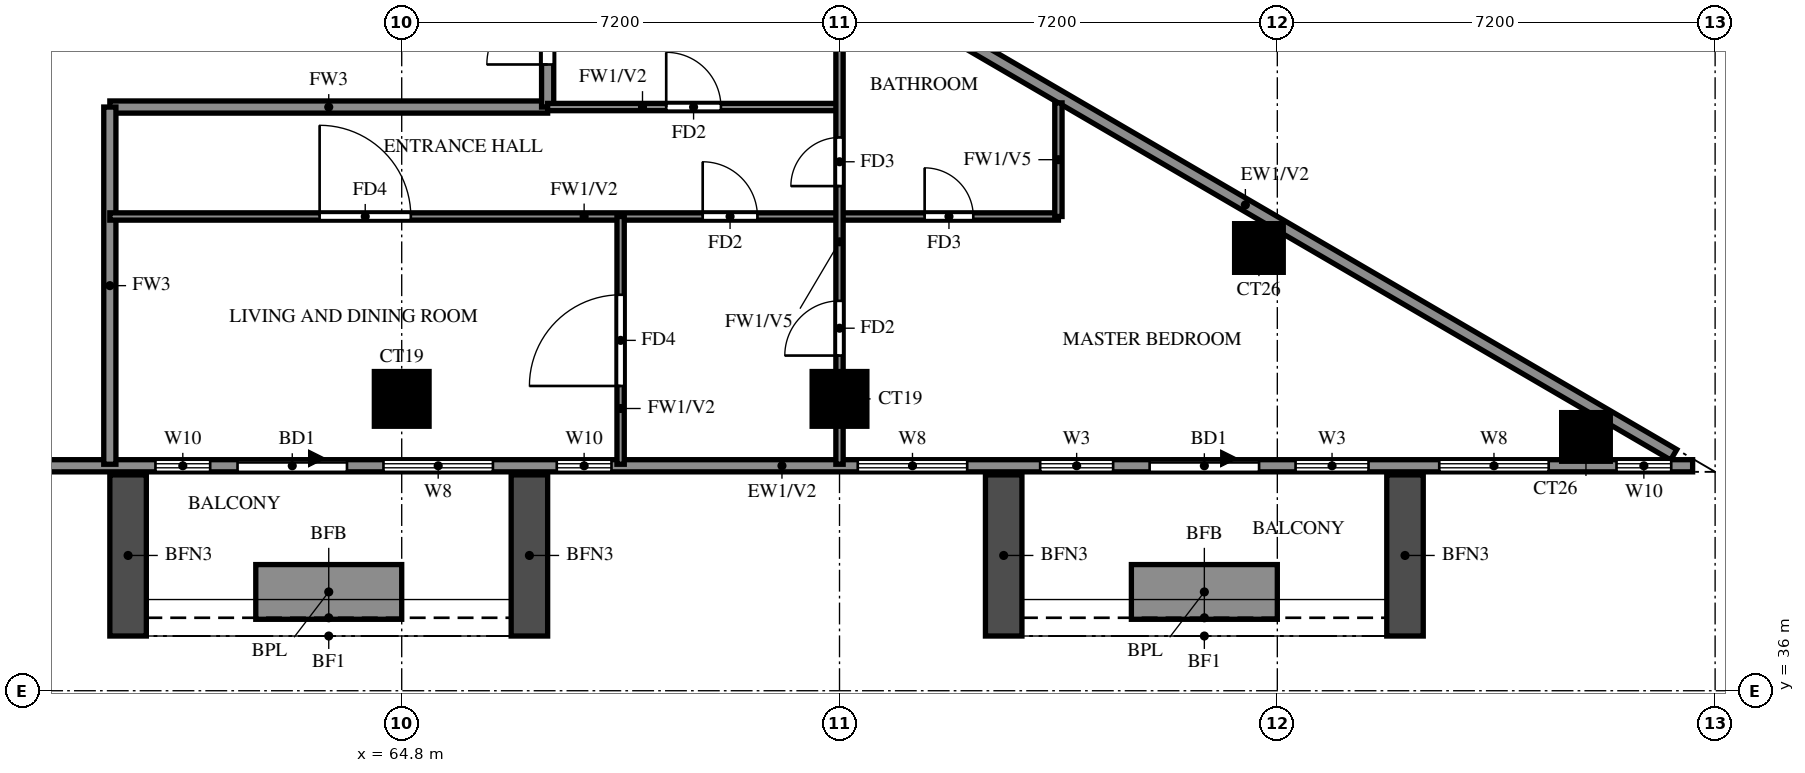
"""IFC4 building model, lengths in metres.
Left out: names, types, materials, properties, quantities, classifications, styles, units other than length and angle.
Written with IfcOpenShell. Run it as: python <this file> out.ifc"""

import sys

from ifc_helpers import new_model, si_unit, direction, frame, frame_2d, origin, origin_2d, place, context, subcontext, project, spatial, rectangle, extrude, source, transform, mapped, element, fill, save


model = new_model("IFC4")
c1 = context("Model", 3, precision=1e-05, world=origin(), true_north=direction((0.0, 1.0)))
c2 = subcontext(c1, "Body", "Model", "MODEL_VIEW")
j1 = project(units=[si_unit("LENGTHUNIT", "METRE"), si_unit("PLANEANGLEUNIT", "RADIAN")], contexts=[c1])
p1 = place(None, origin())
s1 = spatial("IfcSite", under=j1, at=p1, CompositionType="ELEMENT")
p2 = place(p1, origin())
s2 = spatial("IfcBuilding", under=s1, at=p2, CompositionType="ELEMENT")
p3 = place(p2, frame((0.0, 0.0, 174.5)))
s3 = spatial("IfcBuildingStorey", under=s2, at=p3, CompositionType="ELEMENT", Elevation=174.5)
m1 = source(origin(), c2, "Body", "SweptSolid", [
    extrude(rectangle(XDim=0.8, YDim=0.8, at=origin_2d()), origin(), (0.0, 0.0, 1.0), 3.2),
])
p4 = place(p3, frame((84.276, 40.174, 0.0), z_axis=(0.0, 0.0, 1.0), x_axis=(1.0, 0.0, 0.0)))
e1 = element("IfcColumn", 1, at=p4, inside=s3, PredefinedType="COLUMN", context=c2, shape_type="MappedRepresentation", body=[
    mapped(m1, transform((0.0, 0.0, 0.0))),
])
m2 = source(origin(), c2, "Body", "SweptSolid", [
    extrude(rectangle(XDim=0.9, YDim=0.9, at=origin_2d()), origin(), (0.0, 0.0, 1.0), 3.2),
])
for number, where, z_axis, x_axis in (
    (2, (64.8, 40.8, 0.0), (0.0, 0.0, 1.0), (1.0, 0.0, 0.0)),
    (3, (72.0, 40.8, 0.0), (0.0, 0.0, 1.0), (1.0, 0.0, 0.0)),
):
    element("IfcColumn", number, at=place(p3, frame(where, z_axis=z_axis, x_axis=x_axis)), inside=s3, PredefinedType="COLUMN", context=c2, shape_type="MappedRepresentation", body=[
        mapped(m2, transform((0.0, 0.0, 0.0))),
    ])
p5 = place(p3, frame((78.898, 43.282, 0.0), z_axis=(0.0, 0.0, 1.0), x_axis=(1.0, 0.0, 0.0)))
e4 = element("IfcColumn", 4, at=p5, inside=s3, PredefinedType="COLUMN", context=c2, shape_type="MappedRepresentation", body=[
    mapped(m1, transform((0.0, 0.0, 0.0))),
])
p6 = place(p3, frame((85.719, 39.881, 0.0), z_axis=(0.0, 0.0, 1.0), x_axis=(-0.86377618652, 0.503875678716, 0.0)))
e5 = element("IfcWall", 5, at=p6, inside=s3, PredefinedType="SOLIDWALL", context=c2, shape_type="SweptSolid", body=[
    extrude(rectangle(XDim=16.311, YDim=0.2, at=frame_2d((8.156, 0.0))), origin(), (0.0, 0.0, 1.0), 3.2),
])
p7 = place(p6, frame((13.326, 0.0, 1.5)))
e6 = element("IfcOpeningElement", 6, at=p7, cuts=e5, PredefinedType="OPENING", context=c2, shape_type="SweptSolid", body=[
    extrude(rectangle(XDim=0.9, YDim=0.9, at=frame_2d((0.45, 0.45))), frame((0.0, 0.11, 0.0), z_axis=(0.0, -1.0, 0.0), x_axis=(1.0, 0.0, 0.0)), (0.0, 0.0, 1.0), 0.22),
])
p8 = place(p3, frame((58.8, 39.7, 0.0), z_axis=(0.0, 0.0, 1.0), x_axis=(1.0, 0.0, 0.0)))
e7 = element("IfcWall", 7, at=p8, inside=s3, PredefinedType="SOLIDWALL", context=c2, shape_type="SweptSolid", body=[
    extrude(rectangle(XDim=27.23, YDim=0.2, at=frame_2d((13.615, 0.0))), origin(), (0.0, 0.0, 1.0), 3.2),
])
p9 = place(p8, frame((3.3, 0.0, 0.0)))
e8 = element("IfcOpeningElement", 8, at=p9, cuts=e7, PredefinedType="OPENING", context=c2, shape_type="SweptSolid", body=[
    extrude(rectangle(XDim=1.8, YDim=2.4, at=frame_2d((0.9, 1.2))), frame((0.0, 0.11, 0.0), z_axis=(0.0, -1.0, 0.0), x_axis=(1.0, 0.0, 0.0)), (0.0, 0.0, 1.0), 0.22),
])
p10 = place(p8, frame((18.3, 0.0, 0.0)))
e9 = element("IfcOpeningElement", 9, at=p10, cuts=e7, PredefinedType="OPENING", context=c2, shape_type="SweptSolid", body=[
    extrude(rectangle(XDim=1.8, YDim=2.4, at=frame_2d((0.9, 1.2))), frame((0.0, 0.11, 0.0), z_axis=(0.0, -1.0, 0.0), x_axis=(1.0, 0.0, 0.0)), (0.0, 0.0, 1.0), 0.22),
])
p11 = place(p8, frame((1.95, 0.0, 0.6)))
e10 = element("IfcOpeningElement", 10, at=p11, cuts=e7, PredefinedType="OPENING", context=c2, shape_type="SweptSolid", body=[
    extrude(rectangle(XDim=0.9, YDim=2.4, at=frame_2d((0.45, 1.2))), frame((0.0, 0.11, 0.0), z_axis=(0.0, -1.0, 0.0), x_axis=(1.0, 0.0, 0.0)), (0.0, 0.0, 1.0), 0.22),
])
p12 = place(p8, frame((5.7, 0.0, 0.6)))
e11 = element("IfcOpeningElement", 11, at=p12, cuts=e7, PredefinedType="OPENING", context=c2, shape_type="SweptSolid", body=[
    extrude(rectangle(XDim=1.8, YDim=2.4, at=frame_2d((0.9, 1.2))), frame((0.0, 0.11, 0.0), z_axis=(0.0, -1.0, 0.0), x_axis=(1.0, 0.0, 0.0)), (0.0, 0.0, 1.0), 0.22),
])
p13 = place(p8, frame((8.55, 0.0, 0.6)))
e12 = element("IfcOpeningElement", 12, at=p13, cuts=e7, PredefinedType="OPENING", context=c2, shape_type="SweptSolid", body=[
    extrude(rectangle(XDim=0.9, YDim=2.4, at=frame_2d((0.45, 1.2))), frame((0.0, 0.11, 0.0), z_axis=(0.0, -1.0, 0.0), x_axis=(1.0, 0.0, 0.0)), (0.0, 0.0, 1.0), 0.22),
])
p14 = place(p8, frame((13.5, 0.0, 0.6)))
e13 = element("IfcOpeningElement", 13, at=p14, cuts=e7, PredefinedType="OPENING", context=c2, shape_type="SweptSolid", body=[
    extrude(rectangle(XDim=1.8, YDim=2.4, at=frame_2d((0.9, 1.2))), frame((0.0, 0.11, 0.0), z_axis=(0.0, -1.0, 0.0), x_axis=(1.0, 0.0, 0.0)), (0.0, 0.0, 1.0), 0.22),
])
p15 = place(p8, frame((16.5, 0.0, 0.6)))
e14 = element("IfcOpeningElement", 14, at=p15, cuts=e7, PredefinedType="OPENING", context=c2, shape_type="SweptSolid", body=[
    extrude(rectangle(XDim=1.2, YDim=2.4, at=frame_2d((0.6, 1.2))), frame((0.0, 0.11, 0.0), z_axis=(0.0, -1.0, 0.0), x_axis=(1.0, 0.0, 0.0)), (0.0, 0.0, 1.0), 0.22),
])
p16 = place(p8, frame((20.7, 0.0, 0.6)))
e15 = element("IfcOpeningElement", 15, at=p16, cuts=e7, PredefinedType="OPENING", context=c2, shape_type="SweptSolid", body=[
    extrude(rectangle(XDim=1.2, YDim=2.4, at=frame_2d((0.6, 1.2))), frame((0.0, 0.11, 0.0), z_axis=(0.0, -1.0, 0.0), x_axis=(1.0, 0.0, 0.0)), (0.0, 0.0, 1.0), 0.22),
])
p17 = place(p8, frame((23.063, 0.0, 0.6)))
e16 = element("IfcOpeningElement", 16, at=p17, cuts=e7, PredefinedType="OPENING", context=c2, shape_type="SweptSolid", body=[
    extrude(rectangle(XDim=1.8, YDim=2.4, at=frame_2d((0.9, 1.2))), frame((0.0, 0.11, 0.0), z_axis=(0.0, -1.0, 0.0), x_axis=(1.0, 0.0, 0.0)), (0.0, 0.0, 1.0), 0.22),
])
p18 = place(p8, frame((25.978, 0.0, 0.6)))
e17 = element("IfcOpeningElement", 17, at=p18, cuts=e7, PredefinedType="OPENING", context=c2, shape_type="SweptSolid", body=[
    extrude(rectangle(XDim=0.9, YDim=2.4, at=frame_2d((0.45, 1.2))), frame((0.0, 0.11, 0.0), z_axis=(0.0, -1.0, 0.0), x_axis=(1.0, 0.0, 0.0)), (0.0, 0.0, 1.0), 0.22),
])
for number, where, z_axis, x_axis in (
    (18, (60.3, 39.55, 0.0), (0.0, 0.0, 1.0), (0.0, -1.0, 0.0)),
    (19, (66.9, 39.55, 0.0), (0.0, 0.0, 1.0), (0.0, -1.0, 0.0)),
):
    element("IfcWall", number, at=place(p3, frame(where, z_axis=z_axis, x_axis=x_axis)), inside=s3, PredefinedType="SOLIDWALL", context=c2, shape_type="SweptSolid", body=[
        extrude(rectangle(XDim=2.65, YDim=0.6, at=frame_2d((1.325, 0.0))), origin(), (0.0, 0.0, 1.0), 2.85),
    ])
p19 = place(p3, frame((62.4, 37.625, 0.0), z_axis=(0.0, 0.0, 1.0), x_axis=(1.0, 0.0, 0.0)))
e20 = element("IfcWall", 20, at=p19, inside=s3, PredefinedType="SOLIDWALL", context=c2, shape_type="SweptSolid", body=[
    extrude(rectangle(XDim=2.4, YDim=0.9, at=frame_2d((1.2, 0.0))), origin(), (0.0, 0.0, 1.0), 0.9),
])
for number, where, z_axis, x_axis in (
    (21, (74.7, 39.55, 0.0), (0.0, 0.0, 1.0), (0.0, -1.0, 0.0)),
    (22, (81.3, 39.55, 0.0), (0.0, 0.0, 1.0), (0.0, -1.0, 0.0)),
):
    element("IfcWall", number, at=place(p3, frame(where, z_axis=z_axis, x_axis=x_axis)), inside=s3, PredefinedType="SOLIDWALL", context=c2, shape_type="SweptSolid", body=[
        extrude(rectangle(XDim=2.65, YDim=0.6, at=frame_2d((1.325, 0.0))), origin(), (0.0, 0.0, 1.0), 2.85),
    ])
p20 = place(p3, frame((76.8, 37.625, 0.0), z_axis=(0.0, 0.0, 1.0), x_axis=(1.0, 0.0, 0.0)))
e23 = element("IfcWall", 23, at=p20, inside=s3, PredefinedType="SOLIDWALL", context=c2, shape_type="SweptSolid", body=[
    extrude(rectangle(XDim=2.4, YDim=0.9, at=frame_2d((1.2, 0.0))), origin(), (0.0, 0.0, 1.0), 0.9),
])
p21 = place(p3, frame((60.0, 45.6, 0.0), z_axis=(0.0, 0.0, 1.0), x_axis=(1.0, 0.0, 0.0)))
e24 = element("IfcWall", 24, at=p21, inside=s3, PredefinedType="SOLIDWALL", context=c2, shape_type="SweptSolid", body=[
    extrude(rectangle(XDim=7.2, YDim=0.2, at=frame_2d((3.6, 0.0))), origin(), (0.0, 0.0, 1.0), 3.2),
])
p22 = place(p3, frame((60.0, 39.725, 0.0), z_axis=(0.0, 0.0, 1.0), x_axis=(0.0, 1.0, 0.0)))
e25 = element("IfcWall", 25, at=p22, inside=s3, PredefinedType="SOLIDWALL", context=c2, shape_type="SweptSolid", body=[
    extrude(rectangle(XDim=5.875, YDim=0.2, at=frame_2d((2.938, 0.0))), origin(), (0.0, 0.0, 1.0), 3.2),
])
p23 = place(p3, frame((67.2, 45.6, 0.0), z_axis=(0.0, 0.0, 1.0), x_axis=(0.0, 1.0, 0.0)))
e26 = element("IfcWall", 26, at=p23, inside=s3, PredefinedType="SOLIDWALL", context=c2, shape_type="SweptSolid", body=[
    extrude(rectangle(XDim=8.4, YDim=0.2, at=frame_2d((4.2, 0.0))), origin(), (0.0, 0.0, 1.0), 3.2),
])
p24 = place(p23, frame((6.7, 0.0, 0.0)))
e27 = element("IfcOpeningElement", 27, at=p24, cuts=e26, PredefinedType="OPENING", context=c2, shape_type="SweptSolid", body=[
    extrude(rectangle(XDim=1.0, YDim=2.1, at=frame_2d((0.5, 1.05))), frame((0.0, 0.11, 0.0), z_axis=(0.0, -1.0, 0.0), x_axis=(1.0, 0.0, 0.0)), (0.0, 0.0, 1.0), 0.22),
])
p25 = place(p23, frame((0.7, 0.0, 0.0)))
e28 = element("IfcOpeningElement", 28, at=p25, cuts=e26, PredefinedType="OPENING", context=c2, shape_type="SweptSolid", body=[
    extrude(rectangle(XDim=1.0, YDim=2.1, at=frame_2d((0.5, 1.05))), frame((0.0, 0.11, 0.0), z_axis=(0.0, -1.0, 0.0), x_axis=(1.0, 0.0, 0.0)), (0.0, 0.0, 1.0), 0.22),
])
p26 = place(p3, frame((60.0, 43.8, 0.0), z_axis=(0.0, 0.0, 1.0), x_axis=(1.0, 0.0, 0.0)))
e29 = element("IfcWall", 29, at=p26, inside=s3, PredefinedType="PARTITIONING", context=c2, shape_type="SweptSolid", body=[
    extrude(rectangle(XDim=15.6, YDim=0.12, at=frame_2d((7.8, 0.0))), origin(), (0.0, 0.0, 1.0), 3.2),
])
p27 = place(p26, frame((9.75, 0.0, 0.0)))
e30 = element("IfcOpeningElement", 30, at=p27, cuts=e29, PredefinedType="OPENING", context=c2, shape_type="SweptSolid", body=[
    extrude(rectangle(XDim=0.9, YDim=2.1, at=frame_2d((0.45, 1.05))), frame((0.0, 0.07, 0.0), z_axis=(0.0, -1.0, 0.0), x_axis=(1.0, 0.0, 0.0)), (0.0, 0.0, 1.0), 0.14),
])
p28 = place(p26, frame((3.45, 0.0, 0.0)))
e31 = element("IfcOpeningElement", 31, at=p28, cuts=e29, PredefinedType="OPENING", context=c2, shape_type="SweptSolid", body=[
    extrude(rectangle(XDim=1.5, YDim=2.1, at=frame_2d((0.75, 1.05))), frame((0.0, 0.07, 0.0), z_axis=(0.0, -1.0, 0.0), x_axis=(1.0, 0.0, 0.0)), (0.0, 0.0, 1.0), 0.14),
])
p29 = place(p26, frame((13.4, 0.0, 0.0)))
e32 = element("IfcOpeningElement", 32, at=p29, cuts=e29, PredefinedType="OPENING", context=c2, shape_type="SweptSolid", body=[
    extrude(rectangle(XDim=0.8, YDim=2.1, at=frame_2d((0.4, 1.05))), frame((0.0, 0.07, 0.0), z_axis=(0.0, -1.0, 0.0), x_axis=(1.0, 0.0, 0.0)), (0.0, 0.0, 1.0), 0.14),
])
p30 = place(p3, frame((67.2, 45.6, 0.0), z_axis=(0.0, 0.0, 1.0), x_axis=(1.0, 0.0, 0.0)))
e33 = element("IfcWall", 33, at=p30, inside=s3, PredefinedType="PARTITIONING", context=c2, shape_type="SweptSolid", body=[
    extrude(rectangle(XDim=4.8, YDim=0.12, at=frame_2d((2.4, 0.0))), origin(), (0.0, 0.0, 1.0), 3.2),
])
p31 = place(p30, frame((1.95, 0.0, 0.0)))
e34 = element("IfcOpeningElement", 34, at=p31, cuts=e33, PredefinedType="OPENING", context=c2, shape_type="SweptSolid", body=[
    extrude(rectangle(XDim=0.9, YDim=2.1, at=frame_2d((0.45, 1.05))), frame((0.0, 0.07, 0.0), z_axis=(0.0, -1.0, 0.0), x_axis=(1.0, 0.0, 0.0)), (0.0, 0.0, 1.0), 0.14),
])
p32 = place(p3, frame((68.4, 39.725, 0.0), z_axis=(0.0, 0.0, 1.0), x_axis=(0.0, 1.0, 0.0)))
e35 = element("IfcWall", 35, at=p32, inside=s3, PredefinedType="PARTITIONING", context=c2, shape_type="SweptSolid", body=[
    extrude(rectangle(XDim=4.075, YDim=0.12, at=frame_2d((2.038, 0.0))), origin(), (0.0, 0.0, 1.0), 3.2),
])
p33 = place(p32, frame((1.288, 0.0, 0.0)))
e36 = element("IfcOpeningElement", 36, at=p33, cuts=e35, PredefinedType="OPENING", context=c2, shape_type="SweptSolid", body=[
    extrude(rectangle(XDim=1.5, YDim=2.1, at=frame_2d((0.75, 1.05))), frame((0.0, 0.07, 0.0), z_axis=(0.0, -1.0, 0.0), x_axis=(1.0, 0.0, 0.0)), (0.0, 0.0, 1.0), 0.14),
])
p34 = place(p3, frame((72.0, 39.725, 0.0), z_axis=(0.0, 0.0, 1.0), x_axis=(0.0, 1.0, 0.0)))
e37 = element("IfcWall", 37, at=p34, inside=s3, PredefinedType="PARTITIONING", context=c2, shape_type="SweptSolid", body=[
    extrude(rectangle(XDim=8.13, YDim=0.12, at=frame_2d((4.065, 0.0))), origin(), (0.0, 0.0, 1.0), 2.3),
])
p35 = place(p34, frame((1.788, 0.0, 0.0)))
e38 = element("IfcOpeningElement", 38, at=p35, cuts=e37, PredefinedType="OPENING", context=c2, shape_type="SweptSolid", body=[
    extrude(rectangle(XDim=0.9, YDim=2.1, at=frame_2d((0.45, 1.05))), frame((0.0, 0.07, 0.0), z_axis=(0.0, -1.0, 0.0), x_axis=(1.0, 0.0, 0.0)), (0.0, 0.0, 1.0), 0.14),
])
p36 = place(p34, frame((4.575, 0.0, 0.0)))
e39 = element("IfcOpeningElement", 39, at=p36, cuts=e37, PredefinedType="OPENING", context=c2, shape_type="SweptSolid", body=[
    extrude(rectangle(XDim=0.8, YDim=2.1, at=frame_2d((0.4, 1.05))), frame((0.0, 0.07, 0.0), z_axis=(0.0, -1.0, 0.0), x_axis=(1.0, 0.0, 0.0)), (0.0, 0.0, 1.0), 0.14),
])
p37 = place(p3, frame((75.6, 43.8, 0.0), z_axis=(0.0, 0.0, 1.0), x_axis=(0.0, 1.0, 0.0)))
e40 = element("IfcWall", 40, at=p37, inside=s3, PredefinedType="PARTITIONING", context=c2, shape_type="SweptSolid", body=[
    extrude(rectangle(XDim=1.868, YDim=0.12, at=frame_2d((0.934, 0.0))), origin(), (0.0, 0.0, 1.0), 2.3),
])
p38 = place(p9, origin())
e41 = element("IfcDoor", 41, at=p38, inside=s3, OperationType="DOUBLE_DOOR_SLIDING", PredefinedType="DOOR", context=c2, shape_type="SweptSolid", body=[
    extrude(rectangle(XDim=1.8, YDim=2.4, at=frame_2d((0.9, 1.2))), frame((0.0, 0.025, 0.0), z_axis=(0.0, -1.0, 0.0), x_axis=(1.0, 0.0, 0.0)), (0.0, 0.0, 1.0), 0.05),
])
fill(e8, e41)
p39 = place(p10, origin())
e42 = element("IfcDoor", 42, at=p39, inside=s3, OperationType="DOUBLE_DOOR_SLIDING", PredefinedType="DOOR", context=c2, shape_type="SweptSolid", body=[
    extrude(rectangle(XDim=1.8, YDim=2.4, at=frame_2d((0.9, 1.2))), frame((0.0, 0.025, 0.0), z_axis=(0.0, -1.0, 0.0), x_axis=(1.0, 0.0, 0.0)), (0.0, 0.0, 1.0), 0.05),
])
fill(e9, e42)
p40 = place(p11, origin())
e43 = element("IfcWindow", 43, at=p40, inside=s3, PartitioningType="SINGLE_PANEL", PredefinedType="WINDOW", context=c2, shape_type="SweptSolid", body=[
    extrude(rectangle(XDim=0.9, YDim=2.4, at=frame_2d((0.45, 1.2))), frame((0.0, 0.03, 0.0), z_axis=(0.0, -1.0, 0.0), x_axis=(1.0, 0.0, 0.0)), (0.0, 0.0, 1.0), 0.06),
])
fill(e10, e43)
p41 = place(p12, origin())
e44 = element("IfcWindow", 44, at=p41, inside=s3, PartitioningType="DOUBLE_PANEL_VERTICAL", PredefinedType="WINDOW", context=c2, shape_type="SweptSolid", body=[
    extrude(rectangle(XDim=1.8, YDim=2.4, at=frame_2d((0.9, 1.2))), frame((0.0, 0.03, 0.0), z_axis=(0.0, -1.0, 0.0), x_axis=(1.0, 0.0, 0.0)), (0.0, 0.0, 1.0), 0.06),
])
fill(e11, e44)
p42 = place(p13, origin())
e45 = element("IfcWindow", 45, at=p42, inside=s3, PartitioningType="SINGLE_PANEL", PredefinedType="WINDOW", context=c2, shape_type="SweptSolid", body=[
    extrude(rectangle(XDim=0.9, YDim=2.4, at=frame_2d((0.45, 1.2))), frame((0.0, 0.03, 0.0), z_axis=(0.0, -1.0, 0.0), x_axis=(1.0, 0.0, 0.0)), (0.0, 0.0, 1.0), 0.06),
])
fill(e12, e45)
p43 = place(p14, origin())
e46 = element("IfcWindow", 46, at=p43, inside=s3, PartitioningType="DOUBLE_PANEL_VERTICAL", PredefinedType="WINDOW", context=c2, shape_type="SweptSolid", body=[
    extrude(rectangle(XDim=1.8, YDim=2.4, at=frame_2d((0.9, 1.2))), frame((0.0, 0.03, 0.0), z_axis=(0.0, -1.0, 0.0), x_axis=(1.0, 0.0, 0.0)), (0.0, 0.0, 1.0), 0.06),
])
fill(e13, e46)
p44 = place(p15, origin())
e47 = element("IfcWindow", 47, at=p44, inside=s3, PartitioningType="SINGLE_PANEL", PredefinedType="WINDOW", context=c2, shape_type="SweptSolid", body=[
    extrude(rectangle(XDim=1.2, YDim=2.4, at=frame_2d((0.6, 1.2))), frame((0.0, 0.03, 0.0), z_axis=(0.0, -1.0, 0.0), x_axis=(1.0, 0.0, 0.0)), (0.0, 0.0, 1.0), 0.06),
])
fill(e14, e47)
p45 = place(p16, origin())
e48 = element("IfcWindow", 48, at=p45, inside=s3, PartitioningType="SINGLE_PANEL", PredefinedType="WINDOW", context=c2, shape_type="SweptSolid", body=[
    extrude(rectangle(XDim=1.2, YDim=2.4, at=frame_2d((0.6, 1.2))), frame((0.0, 0.03, 0.0), z_axis=(0.0, -1.0, 0.0), x_axis=(1.0, 0.0, 0.0)), (0.0, 0.0, 1.0), 0.06),
])
fill(e15, e48)
p46 = place(p17, origin())
e49 = element("IfcWindow", 49, at=p46, inside=s3, PartitioningType="DOUBLE_PANEL_VERTICAL", PredefinedType="WINDOW", context=c2, shape_type="SweptSolid", body=[
    extrude(rectangle(XDim=1.8, YDim=2.4, at=frame_2d((0.9, 1.2))), frame((0.0, 0.03, 0.0), z_axis=(0.0, -1.0, 0.0), x_axis=(1.0, 0.0, 0.0)), (0.0, 0.0, 1.0), 0.06),
])
fill(e16, e49)
p47 = place(p18, origin())
e50 = element("IfcWindow", 50, at=p47, inside=s3, PartitioningType="SINGLE_PANEL", PredefinedType="WINDOW", context=c2, shape_type="SweptSolid", body=[
    extrude(rectangle(XDim=0.9, YDim=2.4, at=frame_2d((0.45, 1.2))), frame((0.0, 0.03, 0.0), z_axis=(0.0, -1.0, 0.0), x_axis=(1.0, 0.0, 0.0)), (0.0, 0.0, 1.0), 0.06),
])
fill(e17, e50)
p48 = place(p33, origin())
e51 = element("IfcDoor", 51, at=p48, inside=s3, OperationType="SINGLE_SWING_RIGHT", PredefinedType="DOOR", context=c2, shape_type="SweptSolid", body=[
    extrude(rectangle(XDim=1.5, YDim=2.1, at=frame_2d((0.75, 1.05))), frame((0.0, 0.025, 0.0), z_axis=(0.0, -1.0, 0.0), x_axis=(1.0, 0.0, 0.0)), (0.0, 0.0, 1.0), 0.05),
])
fill(e36, e51)
p49 = place(p31, origin())
e52 = element("IfcDoor", 52, at=p49, inside=s3, OperationType="SINGLE_SWING_LEFT", PredefinedType="DOOR", context=c2, shape_type="SweptSolid", body=[
    extrude(rectangle(XDim=0.9, YDim=2.1, at=frame_2d((0.45, 1.05))), frame((0.0, 0.025, 0.0), z_axis=(0.0, -1.0, 0.0), x_axis=(1.0, 0.0, 0.0)), (0.0, 0.0, 1.0), 0.05),
])
fill(e34, e52)
p50 = place(p25, origin())
e53 = element("IfcDoor", 53, at=p50, inside=s3, OperationType="SINGLE_SWING_LEFT", PredefinedType="DOOR", context=c2, shape_type="SweptSolid", body=[
    extrude(rectangle(XDim=1.0, YDim=2.1, at=frame_2d((0.5, 1.05))), frame((0.0, 0.025, 0.0), z_axis=(0.0, -1.0, 0.0), x_axis=(1.0, 0.0, 0.0)), (0.0, 0.0, 1.0), 0.05),
])
fill(e28, e53)
p51 = place(p27, origin())
e54 = element("IfcDoor", 54, at=p51, inside=s3, OperationType="SINGLE_SWING_RIGHT", PredefinedType="DOOR", context=c2, shape_type="SweptSolid", body=[
    extrude(rectangle(XDim=0.9, YDim=2.1, at=frame_2d((0.45, 1.05))), frame((0.0, 0.025, 0.0), z_axis=(0.0, -1.0, 0.0), x_axis=(1.0, 0.0, 0.0)), (0.0, 0.0, 1.0), 0.05),
])
fill(e30, e54)
p52 = place(p28, origin())
e55 = element("IfcDoor", 55, at=p52, inside=s3, OperationType="SINGLE_SWING_LEFT", PredefinedType="DOOR", context=c2, shape_type="SweptSolid", body=[
    extrude(rectangle(XDim=1.5, YDim=2.1, at=frame_2d((0.75, 1.05))), frame((0.0, 0.025, 0.0), z_axis=(0.0, -1.0, 0.0), x_axis=(1.0, 0.0, 0.0)), (0.0, 0.0, 1.0), 0.05),
])
fill(e31, e55)
p53 = place(p35, origin())
e56 = element("IfcDoor", 56, at=p53, inside=s3, OperationType="SINGLE_SWING_RIGHT", PredefinedType="DOOR", context=c2, shape_type="SweptSolid", body=[
    extrude(rectangle(XDim=0.9, YDim=2.1, at=frame_2d((0.45, 1.05))), frame((0.0, 0.025, 0.0), z_axis=(0.0, -1.0, 0.0), x_axis=(1.0, 0.0, 0.0)), (0.0, 0.0, 1.0), 0.05),
])
fill(e38, e56)
p54 = place(p36, origin())
e57 = element("IfcDoor", 57, at=p54, inside=s3, OperationType="SINGLE_SWING_RIGHT", PredefinedType="DOOR", context=c2, shape_type="SweptSolid", body=[
    extrude(rectangle(XDim=0.8, YDim=2.1, at=frame_2d((0.4, 1.05))), frame((0.0, 0.025, 0.0), z_axis=(0.0, -1.0, 0.0), x_axis=(1.0, 0.0, 0.0)), (0.0, 0.0, 1.0), 0.05),
])
fill(e39, e57)
p55 = place(p29, origin())
e58 = element("IfcDoor", 58, at=p55, inside=s3, OperationType="SINGLE_SWING_LEFT", PredefinedType="DOOR", context=c2, shape_type="SweptSolid", body=[
    extrude(rectangle(XDim=0.8, YDim=2.1, at=frame_2d((0.4, 1.05))), frame((0.0, 0.025, 0.0), z_axis=(0.0, -1.0, 0.0), x_axis=(1.0, 0.0, 0.0)), (0.0, 0.0, 1.0), 0.05),
])
fill(e32, e58)
save(model, sys.argv[1])
